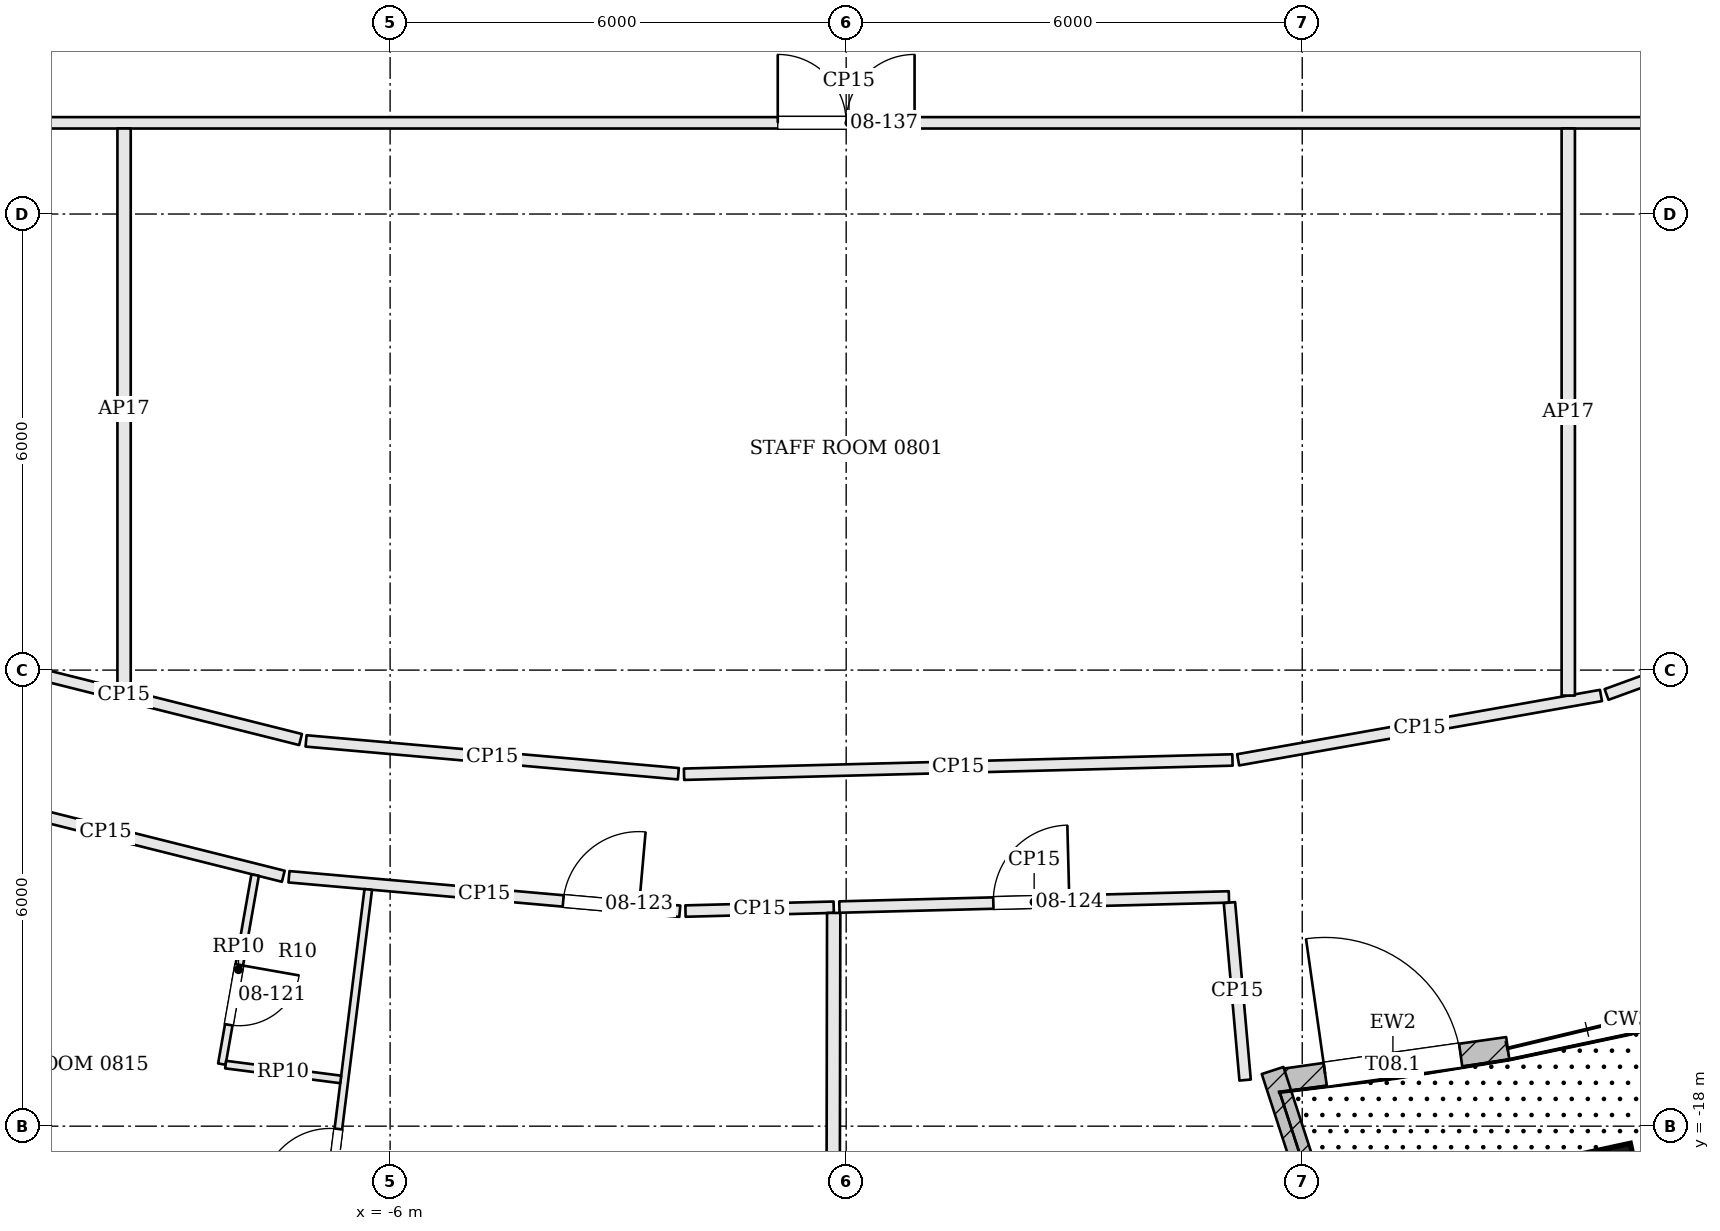
"""IFC4 building model, lengths in metres.
Left out: names, types, materials, properties, quantities, classifications, styles, units other than length and angle.
Written with IfcOpenShell. Run it as: python <this file> out.ifc"""

import sys

from ifc_helpers import new_model, si_unit, direction, frame, frame_2d, origin, origin_2d, place, context, subcontext, project, spatial, rectangle, extrude, element, fill, save


model = new_model("IFC4")
c1 = context("Model", 3, precision=1e-05, world=origin(), true_north=direction((0.0, 1.0)))
c2 = subcontext(c1, "Body", "Model", "MODEL_VIEW")
j1 = project(units=[si_unit("LENGTHUNIT", "METRE"), si_unit("PLANEANGLEUNIT", "RADIAN")], contexts=[c1])
p1 = place(None, origin())
s1 = spatial("IfcSite", under=j1, at=p1, CompositionType="ELEMENT")
p2 = place(p1, origin())
s2 = spatial("IfcBuilding", under=s1, at=p2, CompositionType="ELEMENT")
p3 = place(p2, frame((0.0, 0.0, 44.7)))
s3 = spatial("IfcBuildingStorey", under=s2, at=p3, CompositionType="ELEMENT", Elevation=44.7)
p4 = place(p3, frame((9.78, -19.058, 0.0), z_axis=(0.0, 0.0, 1.0), x_axis=(0.977386186482, 0.211462153764, 0.0)))
e1 = element("IfcColumn", 1, at=p4, inside=s3, PredefinedType="COLUMN", context=c2, shape_type="SweptSolid", body=[
    extrude(rectangle(XDim=1.4, YDim=1.4, at=origin_2d()), origin(), (0.0, 0.0, 1.0), 3.6),
])
p5 = place(p3, frame((5.682, -17.405, 0.0), z_axis=(0.0, 0.0, 1.0), x_axis=(0.990121520331, 0.140211893137, 0.0)))
e2 = element("IfcWall", 2, at=p5, inside=s3, PredefinedType="SOLIDWALL", context=c2, shape_type="SweptSolid", body=[
    extrude(rectangle(XDim=3.052, YDim=0.3, at=frame_2d((1.526, 0.0))), origin(), (0.0, 0.0, 1.0), 2.7),
])
p6 = place(p5, frame((0.626, 0.0, 0.0)))
e3 = element("IfcOpeningElement", 3, at=p6, cuts=e2, PredefinedType="OPENING", context=c2, shape_type="SweptSolid", body=[
    extrude(rectangle(XDim=1.8, YDim=2.4, at=frame_2d((0.9, 1.2))), frame((0.0, 0.16, 0.0), z_axis=(0.0, -1.0, 0.0), x_axis=(1.0, 0.0, 0.0)), (0.0, 0.0, 1.0), 0.32),
])
p7 = place(p3, frame((6.752, -20.779, 0.0), z_axis=(0.0, 0.0, 1.0), x_axis=(-0.309237068707, 0.950984981657, 0.0)))
e4 = element("IfcWall", 4, at=p7, inside=s3, PredefinedType="SOLIDWALL", context=c2, shape_type="SweptSolid", body=[
    extrude(rectangle(XDim=3.692, YDim=0.3, at=frame_2d((1.846, 0.0))), origin(), (0.0, 0.0, 1.0), 2.954),
])
p8 = place(p3, frame((-12.083, -13.54, 0.0), z_axis=(0.0, 0.0, 1.0), x_axis=(0.969981460173, -0.243178878443, 0.0)))
e5 = element("IfcWall", 5, at=p8, inside=s3, PredefinedType="PARTITIONING", context=c2, shape_type="SweptSolid", body=[
    extrude(rectangle(XDim=4.822, YDim=0.15, at=frame_2d((2.411, 0.0))), origin(), (0.0, 0.0, 1.0), 2.68),
])
p9 = place(p3, frame((-7.331, -14.719, 0.0), z_axis=(0.0, 0.0, 1.0), x_axis=(0.996139466017, -0.087784760882, 0.0)))
e6 = element("IfcWall", 6, at=p9, inside=s3, PredefinedType="PARTITIONING", context=c2, shape_type="SweptSolid", body=[
    extrude(rectangle(XDim=5.162, YDim=0.15, at=frame_2d((2.581, 0.0))), origin(), (0.0, 0.0, 1.0), 2.68),
])
p10 = place(p9, frame((3.622, 0.0, 0.0)))
e7 = element("IfcOpeningElement", 7, at=p10, cuts=e6, PredefinedType="OPENING", context=c2, shape_type="SweptSolid", body=[
    extrude(rectangle(XDim=1.0, YDim=2.1, at=frame_2d((0.5, 1.05))), frame((0.0, 0.085, 0.0), z_axis=(0.0, -1.0, 0.0), x_axis=(1.0, 0.0, 0.0)), (0.0, 0.0, 1.0), 0.17),
])
p11 = place(p3, frame((-2.114, -15.17, 0.0), z_axis=(0.0, 0.0, 1.0), x_axis=(0.999660986361, 0.026036749958, 0.0)))
e8 = element("IfcWall", 8, at=p11, inside=s3, PredefinedType="PARTITIONING", context=c2, shape_type="SweptSolid", body=[
    extrude(rectangle(XDim=1.95, YDim=0.15, at=frame_2d((0.975, 0.0))), origin(), (0.0, 0.0, 1.0), 2.68),
])
p12 = place(p3, frame((-0.179, -23.687, 0.0), z_axis=(0.0, 0.0, 1.0), x_axis=(0.001753677156, 0.999998462307, 0.0)))
e9 = element("IfcWall", 9, at=p12, inside=s3, PredefinedType="PARTITIONING", context=c2, shape_type="SweptSolid", body=[
    extrude(rectangle(XDim=8.492, YDim=0.175, at=frame_2d((4.246, 0.0))), origin(), (0.0, 0.0, 1.0), 2.68),
])
p13 = place(p3, frame((-0.089, -15.117, 0.0), z_axis=(0.0, 0.0, 1.0), x_axis=(0.999661881663, 0.026002352789, 0.0)))
e10 = element("IfcWall", 10, at=p13, inside=s3, PredefinedType="PARTITIONING", context=c2, shape_type="SweptSolid", body=[
    extrude(rectangle(XDim=5.126, YDim=0.15, at=frame_2d((2.563, 0.0))), origin(), (0.0, 0.0, 1.0), 2.68),
])
p14 = place(p13, frame((2.026, 0.0, 0.0)))
e11 = element("IfcOpeningElement", 11, at=p14, cuts=e10, PredefinedType="OPENING", context=c2, shape_type="SweptSolid", body=[
    extrude(rectangle(XDim=1.0, YDim=2.4, at=frame_2d((0.5, 1.2))), frame((0.0, 0.085, 0.0), z_axis=(0.0, -1.0, 0.0), x_axis=(1.0, 0.0, 0.0)), (0.0, 0.0, 1.0), 0.17),
])
p15 = place(p3, frame((5.249, -17.393, 0.0), z_axis=(0.0, 0.0, 1.0), x_axis=(-0.088027582278, 0.996118037563, 0.0)))
e12 = element("IfcWall", 12, at=p15, inside=s3, PredefinedType="PARTITIONING", context=c2, shape_type="SweptSolid", body=[
    extrude(rectangle(XDim=2.344, YDim=0.15, at=frame_2d((1.172, 0.0))), origin(), (0.0, 0.0, 1.0), 2.68),
])
p16 = place(p3, frame((13.511, -11.043, 0.0), z_axis=(0.0, 0.0, 1.0), x_axis=(-0.939583191704, -0.342320647736, 0.0)))
e13 = element("IfcWall", 13, at=p16, inside=s3, PredefinedType="PARTITIONING", context=c2, shape_type="SweptSolid", body=[
    extrude(rectangle(XDim=3.733, YDim=0.15, at=frame_2d((1.866, 0.0))), origin(), (0.0, 0.0, 1.0), 2.68),
])
p17 = place(p3, frame((9.93, -12.334, 0.0), z_axis=(0.0, 0.0, 1.0), x_axis=(-0.984638212434, -0.174606960386, 0.0)))
e14 = element("IfcWall", 14, at=p17, inside=s3, PredefinedType="PARTITIONING", context=c2, shape_type="SweptSolid", body=[
    extrude(rectangle(XDim=4.848, YDim=0.15, at=frame_2d((2.424, 0.0))), origin(), (0.0, 0.0, 1.0), 2.68),
])
p18 = place(p3, frame((5.082, -13.182, 0.0), z_axis=(0.0, 0.0, 1.0), x_axis=(-0.999661624383, -0.026012242045, 0.0)))
e15 = element("IfcWall", 15, at=p18, inside=s3, PredefinedType="PARTITIONING", context=c2, shape_type="SweptSolid", body=[
    extrude(rectangle(XDim=7.218, YDim=0.15, at=frame_2d((3.609, 0.0))), origin(), (0.0, 0.0, 1.0), 2.68),
])
p19 = place(p3, frame((-2.208, -13.364, 0.0), z_axis=(0.0, 0.0, 1.0), x_axis=(-0.996134962793, 0.087835846335, 0.0)))
e16 = element("IfcWall", 16, at=p19, inside=s3, PredefinedType="PARTITIONING", context=c2, shape_type="SweptSolid", body=[
    extrude(rectangle(XDim=4.917, YDim=0.15, at=frame_2d((2.458, 0.0))), origin(), (0.0, 0.0, 1.0), 2.68),
])
p20 = place(p3, frame((-7.178, -12.914, 0.0), z_axis=(0.0, 0.0, 1.0), x_axis=(-0.969983523639, 0.243170647628, 0.0)))
e17 = element("IfcWall", 17, at=p20, inside=s3, PredefinedType="PARTITIONING", context=c2, shape_type="SweptSolid", body=[
    extrude(rectangle(XDim=4.794, YDim=0.15, at=frame_2d((2.397, 0.0))), origin(), (0.0, 0.0, 1.0), 2.68),
])
p21 = place(p3, frame((-14.725, -4.8, 0.0), z_axis=(0.0, 0.0, 1.0), x_axis=(1.0, 0.0, 0.0)))
e18 = element("IfcWall", 18, at=p21, inside=s3, PredefinedType="PARTITIONING", context=c2, shape_type="SweptSolid", body=[
    extrude(rectangle(XDim=29.525, YDim=0.15, at=frame_2d((14.763, 0.0))), origin(), (0.0, 0.0, 1.0), 2.68),
])
p22 = place(p21, frame((2.075, 0.0, 0.0)))
e19 = element("IfcOpeningElement", 19, at=p22, cuts=e18, PredefinedType="OPENING", context=c2, shape_type="SweptSolid", body=[
    extrude(rectangle(XDim=1.0, YDim=2.4, at=frame_2d((0.5, 1.2))), frame((0.0, 0.085, 0.0), z_axis=(0.0, -1.0, 0.0), x_axis=(1.0, 0.0, 0.0)), (0.0, 0.0, 1.0), 0.17),
])
p23 = place(p21, frame((13.825, 0.0, 0.0)))
e20 = element("IfcOpeningElement", 20, at=p23, cuts=e18, PredefinedType="OPENING", context=c2, shape_type="SweptSolid", body=[
    extrude(rectangle(XDim=1.8, YDim=2.1, at=frame_2d((0.9, 1.05))), frame((0.0, 0.085, 0.0), z_axis=(0.0, -1.0, 0.0), x_axis=(1.0, 0.0, 0.0)), (0.0, 0.0, 1.0), 0.17),
])
p24 = place(p21, frame((26.375, 0.0, 0.0)))
e21 = element("IfcOpeningElement", 21, at=p24, cuts=e18, PredefinedType="OPENING", context=c2, shape_type="SweptSolid", body=[
    extrude(rectangle(XDim=1.0, YDim=2.4, at=frame_2d((0.5, 1.2))), frame((0.0, 0.085, 0.0), z_axis=(0.0, -1.0, 0.0), x_axis=(1.0, 0.0, 0.0)), (0.0, 0.0, 1.0), 0.17),
])
p25 = place(p3, frame((-7.275, -22.795, 0.0), z_axis=(0.0, 0.0, 1.0), x_axis=(0.123872623133, 0.992298127197, 0.0)))
e22 = element("IfcWall", 22, at=p25, inside=s3, PredefinedType="PARTITIONING", context=c2, shape_type="SweptSolid", body=[
    extrude(rectangle(XDim=7.97, YDim=0.1, at=frame_2d((3.985, 0.0))), origin(), (0.0, 0.0, 1.0), 2.68),
])
p26 = place(p25, frame((3.895, 0.0, 0.0)))
e23 = element("IfcOpeningElement", 23, at=p26, cuts=e22, PredefinedType="OPENING", context=c2, shape_type="SweptSolid", body=[
    extrude(rectangle(XDim=0.9, YDim=2.4, at=frame_2d((0.45, 1.2))), frame((0.0, 0.06, 0.0), z_axis=(0.0, -1.0, 0.0), x_axis=(1.0, 0.0, 0.0)), (0.0, 0.0, 1.0), 0.12),
])
p27 = place(p3, frame((-7.776, -14.697, 0.0), z_axis=(0.0, 0.0, 1.0), x_axis=(-0.173360606745, -0.984858416235, 0.0)))
e24 = element("IfcWall", 24, at=p27, inside=s3, PredefinedType="PARTITIONING", context=c2, shape_type="SweptSolid", body=[
    extrude(rectangle(XDim=2.525, YDim=0.1, at=frame_2d((1.263, 0.0))), origin(), (0.0, 0.0, 1.0), 2.68),
])
p28 = place(p27, frame((1.2, 0.0, 0.0)))
e25 = element("IfcOpeningElement", 25, at=p28, cuts=e24, PredefinedType="OPENING", context=c2, shape_type="SweptSolid", body=[
    extrude(rectangle(XDim=0.8, YDim=2.1, at=frame_2d((0.4, 1.05))), frame((0.0, 0.06, 0.0), z_axis=(0.0, -1.0, 0.0), x_axis=(1.0, 0.0, 0.0)), (0.0, 0.0, 1.0), 0.12),
])
p29 = place(p3, frame((-8.164, -17.19, 0.0), z_axis=(0.0, 0.0, 1.0), x_axis=(0.991762801698, -0.128088036788, 0.0)))
e26 = element("IfcWall", 26, at=p29, inside=s3, PredefinedType="PARTITIONING", context=c2, shape_type="SweptSolid", body=[
    extrude(rectangle(XDim=1.527, YDim=0.1, at=frame_2d((0.763, 0.0))), origin(), (0.0, 0.0, 1.0), 2.68),
])
p30 = place(p3, frame((-9.5, -12.257, 0.0), z_axis=(0.0, 0.0, 1.0), x_axis=(0.0, 1.0, 0.0)))
e27 = element("IfcWall", 27, at=p30, inside=s3, PredefinedType="PARTITIONING", context=c2, shape_type="SweptSolid", body=[
    extrude(rectangle(XDim=7.382, YDim=0.175, at=frame_2d((3.691, 0.0))), origin(), (0.0, 0.0, 1.0), 2.68),
])
p31 = place(p3, frame((9.5, -12.335, 0.0), z_axis=(0.0, 0.0, 1.0), x_axis=(0.0, 1.0, 0.0)))
e28 = element("IfcWall", 28, at=p31, inside=s3, PredefinedType="PARTITIONING", context=c2, shape_type="SweptSolid", body=[
    extrude(rectangle(XDim=7.46, YDim=0.175, at=frame_2d((3.73, 0.0))), origin(), (0.0, 0.0, 1.0), 2.68),
])
p32 = place(p6, origin())
e29 = element("IfcDoor", 29, at=p32, inside=s3, OperationType="DOUBLE_DOOR_DOUBLE_SWING", PredefinedType="DOOR", context=c2, shape_type="SweptSolid", body=[
    extrude(rectangle(XDim=1.8, YDim=2.4, at=frame_2d((0.9, 1.2))), frame((0.0, 0.025, 0.0), z_axis=(0.0, -1.0, 0.0), x_axis=(1.0, 0.0, 0.0)), (0.0, 0.0, 1.0), 0.05),
])
fill(e3, e29)
p33 = place(p28, origin())
e30 = element("IfcDoor", 30, at=p33, inside=s3, OperationType="SINGLE_SWING_LEFT", PredefinedType="DOOR", context=c2, shape_type="SweptSolid", body=[
    extrude(rectangle(XDim=0.8, YDim=2.1, at=frame_2d((0.4, 1.05))), frame((0.0, 0.025, 0.0), z_axis=(0.0, -1.0, 0.0), x_axis=(1.0, 0.0, 0.0)), (0.0, 0.0, 1.0), 0.05),
])
fill(e25, e30)
p34 = place(p26, origin())
e31 = element("IfcDoor", 31, at=p34, inside=s3, OperationType="SINGLE_SWING_LEFT", PredefinedType="DOOR", context=c2, shape_type="SweptSolid", body=[
    extrude(rectangle(XDim=0.9, YDim=2.4, at=frame_2d((0.45, 1.2))), frame((0.0, 0.025, 0.0), z_axis=(0.0, -1.0, 0.0), x_axis=(1.0, 0.0, 0.0)), (0.0, 0.0, 1.0), 0.05),
])
fill(e23, e31)
p35 = place(p10, origin())
e32 = element("IfcDoor", 32, at=p35, inside=s3, OperationType="SINGLE_SWING_RIGHT", PredefinedType="DOOR", context=c2, shape_type="SweptSolid", body=[
    extrude(rectangle(XDim=1.0, YDim=2.1, at=frame_2d((0.5, 1.05))), frame((0.0, 0.025, 0.0), z_axis=(0.0, -1.0, 0.0), x_axis=(1.0, 0.0, 0.0)), (0.0, 0.0, 1.0), 0.05),
])
fill(e7, e32)
p36 = place(p14, origin())
e33 = element("IfcDoor", 33, at=p36, inside=s3, OperationType="SINGLE_SWING_RIGHT", PredefinedType="DOOR", context=c2, shape_type="SweptSolid", body=[
    extrude(rectangle(XDim=1.0, YDim=2.4, at=frame_2d((0.5, 1.2))), frame((0.0, 0.025, 0.0), z_axis=(0.0, -1.0, 0.0), x_axis=(1.0, 0.0, 0.0)), (0.0, 0.0, 1.0), 0.05),
])
fill(e11, e33)
p37 = place(p23, origin())
e34 = element("IfcDoor", 34, at=p37, inside=s3, OperationType="DOUBLE_DOOR_SINGLE_SWING", PredefinedType="DOOR", context=c2, shape_type="SweptSolid", body=[
    extrude(rectangle(XDim=1.8, YDim=2.1, at=frame_2d((0.9, 1.05))), frame((0.0, 0.025, 0.0), z_axis=(0.0, -1.0, 0.0), x_axis=(1.0, 0.0, 0.0)), (0.0, 0.0, 1.0), 0.05),
])
fill(e20, e34)
save(model, sys.argv[1])
